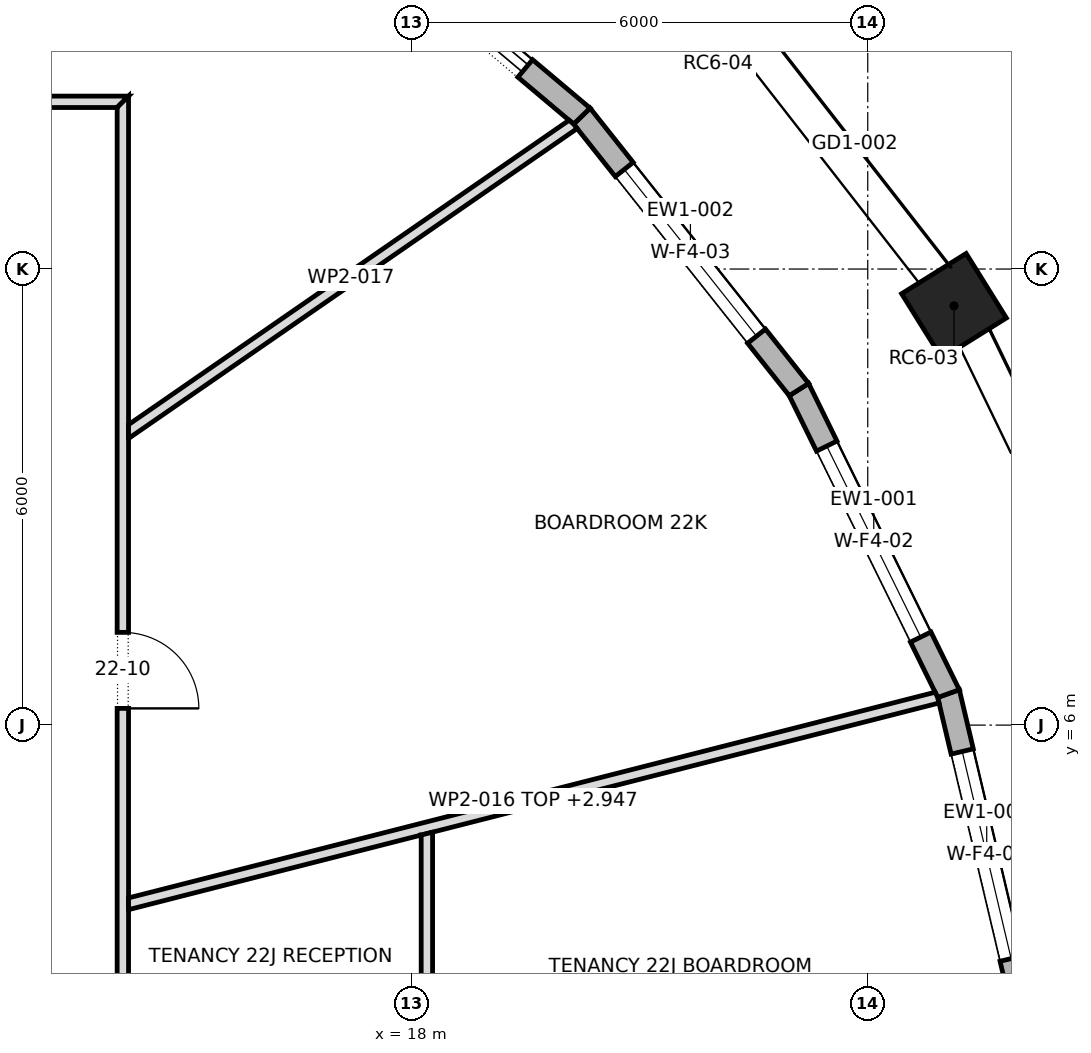
"""IFC4 building model, lengths in metres.
Left out: names, types, materials, properties, quantities, classifications, styles, units other than length and angle.
Written with IfcOpenShell. Run it as: python <this file> out.ifc"""

import sys

from ifc_helpers import new_model, si_unit, direction, frame, frame_2d, origin, origin_2d, place, context, subcontext, project, spatial, polyline, rectangle, outline, extrude, element, fill, save


model = new_model("IFC4")
c1 = context("Model", 3, precision=1e-05, world=origin(), true_north=direction((0.0, 1.0)))
c2 = subcontext(c1, "Body", "Model", "MODEL_VIEW")
j1 = project(units=[si_unit("LENGTHUNIT", "METRE"), si_unit("PLANEANGLEUNIT", "RADIAN")], contexts=[c1])
p1 = place(None, origin())
s1 = spatial("IfcSite", under=j1, at=p1, CompositionType="ELEMENT")
p2 = place(p1, origin())
s2 = spatial("IfcBuilding", under=s1, at=p2, CompositionType="ELEMENT")
p3 = place(p2, frame((0.0, 0.0, 312.3)))
s3 = spatial("IfcBuildingStorey", under=s2, at=p3, CompositionType="ELEMENT", Elevation=312.3)
for number, where, z_axis, x_axis in (
    (1, (25.135, 11.516, 0.0), (0.0, 0.0, 1.0), (-0.529, 0.849, 0.0)),
    (2, (22.031, 15.497, 0.0), (0.0, 0.0, 1.0), (-0.692, 0.722, 0.0)),
):
    element("IfcColumn", number, at=place(p3, frame(where, z_axis=z_axis, x_axis=x_axis)), inside=s3, PredefinedType="COLUMN", context=c2, shape_type="SweptSolid", body=[
        extrude(rectangle(XDim=1.0, YDim=1.0, at=origin_2d()), origin(), (0.0, 0.0, 1.0), 4.0),
    ])
p4 = place(p3, frame((26.067, 2.166, 0.0), z_axis=(0.0, 0.0, 1.0), x_axis=(-0.229974411334, 0.973196675977, 0.0)))
e3 = element("IfcWall", 3, at=p4, inside=s3, PredefinedType="STANDARD", context=c2, shape_type="SweptSolid", body=[
    extrude(outline(polyline([(-0.018, -0.15), (4.382, -0.15), (4.348, 0.15), (0.018, 0.15), (-0.018, -0.15)])), origin(), (0.0, 0.0, 1.0), 3.7),
])
p5 = place(p4, frame((0.783, 0.0, 0.6)))
e4 = element("IfcOpeningElement", 4, at=p5, cuts=e3, PredefinedType="OPENING", context=c2, shape_type="SweptSolid", body=[
    extrude(rectangle(XDim=2.8, YDim=2.65, at=frame_2d((1.4, 1.325))), frame((0.0, 0.162, 0.0), z_axis=(0.0, -1.0, 0.0), x_axis=(1.0, 0.0, 0.0)), (0.0, 0.0, 1.0), 0.324),
])
p6 = place(p3, frame((25.063, 6.415, 0.0), z_axis=(0.0, 0.0, 1.0), x_axis=(-0.441509050872, 0.897256796017, 0.0)))
e5 = element("IfcWall", 5, at=p6, inside=s3, PredefinedType="STANDARD", context=c2, shape_type="SweptSolid", body=[
    extrude(outline(polyline([(-0.017, -0.15), (4.474, -0.15), (4.442, 0.15), (0.017, 0.15), (-0.017, -0.15)])), origin(), (0.0, 0.0, 1.0), 3.7),
])
p7 = place(p6, frame((0.829, 0.0, 0.6)))
e6 = element("IfcOpeningElement", 6, at=p7, cuts=e5, PredefinedType="OPENING", context=c2, shape_type="SweptSolid", body=[
    extrude(rectangle(XDim=2.8, YDim=2.65, at=frame_2d((1.4, 1.325))), frame((0.0, 0.162, 0.0), z_axis=(0.0, -1.0, 0.0), x_axis=(1.0, 0.0, 0.0)), (0.0, 0.0, 1.0), 0.324),
])
p8 = place(p3, frame((23.094, 10.415, 0.0), z_axis=(0.0, 0.0, 1.0), x_axis=(-0.621682706372, 0.78326918272, 0.0)))
e7 = element("IfcWall", 7, at=p8, inside=s3, PredefinedType="STANDARD", context=c2, shape_type="SweptSolid", body=[
    extrude(outline(polyline([(-0.016, -0.15), (4.608, -0.15), (4.578, 0.15), (0.016, 0.15), (-0.016, -0.15)])), origin(), (0.0, 0.0, 1.0), 3.7),
])
p9 = place(p8, frame((0.896, 0.0, 0.6)))
e8 = element("IfcOpeningElement", 8, at=p9, cuts=e7, PredefinedType="OPENING", context=c2, shape_type="SweptSolid", body=[
    extrude(rectangle(XDim=2.8, YDim=2.65, at=frame_2d((1.4, 1.325))), frame((0.0, 0.162, 0.0), z_axis=(0.0, -1.0, 0.0), x_axis=(1.0, 0.0, 0.0)), (0.0, 0.0, 1.0), 0.324),
])
p10 = place(p3, frame((20.239, 14.012, 0.0), z_axis=(0.0, 0.0, 1.0), x_axis=(-0.765059193792, 0.643959959931, 0.0)))
e9 = element("IfcWall", 9, at=p10, inside=s3, PredefinedType="STANDARD", context=c2, shape_type="SweptSolid", body=[
    extrude(outline(polyline([(-0.015, -0.15), (4.762, -0.15), (4.734, 0.15), (0.015, 0.15), (-0.015, -0.15)])), origin(), (0.0, 0.0, 1.0), 3.7),
])
p11 = place(p10, frame((0.974, 0.0, 0.0)))
e10 = element("IfcOpeningElement", 10, at=p11, cuts=e9, PredefinedType="OPENING", context=c2, shape_type="SweptSolid", body=[
    extrude(rectangle(XDim=2.8, YDim=3.25, at=frame_2d((1.4, 1.625))), frame((0.0, 0.162, 0.0), z_axis=(0.0, -1.0, 0.0), x_axis=(1.0, 0.0, 0.0)), (0.0, 0.0, 1.0), 0.324),
])
p12 = place(p3, frame((-14.275, 14.2, 0.0), z_axis=(0.0, 0.0, 1.0), x_axis=(1.0, 0.0, 0.0)))
e11 = element("IfcWall", 11, at=p12, inside=s3, PredefinedType="PARTITIONING", context=c2, shape_type="SweptSolid", body=[
    extrude(outline(polyline([(0.15, -0.075), (2.033, -0.075), (3.917, -0.075), (5.8, -0.075), (7.683, -0.075), (9.567, -0.075), (11.45, -0.075), (13.333, -0.075), (15.217, -0.075), (17.1, -0.075), (18.983, -0.075), (20.866, -0.075), (22.75, -0.075), (24.633, -0.075), (26.517, -0.075), (28.4, -0.075), (28.55, 0.075), (28.55, 0.075), (26.646, 0.075), (24.743, 0.075), (22.84, 0.075), (20.937, 0.075), (19.033, 0.075), (17.13, 0.075), (15.227, 0.075), (13.323, 0.075), (11.42, 0.075), (9.517, 0.075), (7.613, 0.075), (5.71, 0.075), (3.807, 0.075), (1.903, 0.075), (0.0, 0.075), (0.15, -0.075)])), origin(), (0.0, 0.0, 1.0), 3.7),
])
p13 = place(p12, frame((20.045, 0.0, 0.0)))
e12 = element("IfcOpeningElement", 12, at=p13, cuts=e11, PredefinedType="OPENING", context=c2, shape_type="SweptSolid", body=[
    extrude(rectangle(XDim=1.0, YDim=2.1, at=frame_2d((0.5, 1.05))), frame((0.0, 0.087, 0.0), z_axis=(0.0, -1.0, 0.0), x_axis=(1.0, 0.0, 0.0)), (0.0, 0.0, 1.0), 0.174),
])
p14 = place(p12, frame((6.025, 0.0, 0.0)))
e13 = element("IfcOpeningElement", 13, at=p14, cuts=e11, PredefinedType="OPENING", context=c2, shape_type="SweptSolid", body=[
    extrude(rectangle(XDim=1.0, YDim=2.1, at=frame_2d((0.5, 1.05))), frame((0.0, 0.087, 0.0), z_axis=(0.0, -1.0, 0.0), x_axis=(1.0, 0.0, 0.0)), (0.0, 0.0, 1.0), 0.174),
])
p15 = place(p3, frame((14.2, -14.275, 0.0), z_axis=(0.0, 0.0, 1.0), x_axis=(0.0, 1.0, 0.0)))
e14 = element("IfcWall", 14, at=p15, inside=s3, PredefinedType="PARTITIONING", context=c2, shape_type="SweptSolid", body=[
    extrude(outline(polyline([(28.55, -0.075), (28.55, -0.075), (28.4, 0.075), (26.517, 0.075), (24.633, 0.075), (22.75, 0.075), (20.866, 0.075), (18.983, 0.075), (17.1, 0.075), (15.217, 0.075), (13.333, 0.075), (11.45, 0.075), (9.567, 0.075), (7.683, 0.075), (5.8, 0.075), (3.917, 0.075), (2.033, 0.075), (0.15, 0.075), (0.0, -0.075), (1.903, -0.075), (3.807, -0.075), (5.71, -0.075), (7.613, -0.075), (9.517, -0.075), (11.42, -0.075), (13.323, -0.075), (15.227, -0.075), (17.13, -0.075), (19.033, -0.075), (20.937, -0.075), (22.84, -0.075), (24.743, -0.075), (26.646, -0.075), (28.55, -0.075)])), origin(), (0.0, 0.0, 1.0), 3.7),
])
p16 = place(p15, frame((3.48, 0.0, 0.0)))
e15 = element("IfcOpeningElement", 15, at=p16, cuts=e14, PredefinedType="OPENING", context=c2, shape_type="SweptSolid", body=[
    extrude(rectangle(XDim=1.0, YDim=2.1, at=frame_2d((0.5, 1.05))), frame((0.0, 0.087, 0.0), z_axis=(0.0, -1.0, 0.0), x_axis=(1.0, 0.0, 0.0)), (0.0, 0.0, 1.0), 0.174),
])
p17 = place(p15, frame((9.99, 0.0, 0.0)))
e16 = element("IfcOpeningElement", 16, at=p17, cuts=e14, PredefinedType="OPENING", context=c2, shape_type="SweptSolid", body=[
    extrude(rectangle(XDim=1.0, YDim=2.1, at=frame_2d((0.5, 1.05))), frame((0.0, 0.087, 0.0), z_axis=(0.0, -1.0, 0.0), x_axis=(1.0, 0.0, 0.0)), (0.0, 0.0, 1.0), 0.174),
])
p18 = place(p15, frame((15.0, 0.0, 0.0)))
e17 = element("IfcOpeningElement", 17, at=p18, cuts=e14, PredefinedType="OPENING", context=c2, shape_type="SweptSolid", body=[
    extrude(rectangle(XDim=1.0, YDim=2.1, at=frame_2d((0.5, 1.05))), frame((0.0, 0.087, 0.0), z_axis=(0.0, -1.0, 0.0), x_axis=(1.0, 0.0, 0.0)), (0.0, 0.0, 1.0), 0.174),
])
p19 = place(p15, frame((20.495, 0.0, 0.0)))
e18 = element("IfcOpeningElement", 18, at=p19, cuts=e14, PredefinedType="OPENING", context=c2, shape_type="SweptSolid", body=[
    extrude(rectangle(XDim=1.0, YDim=2.1, at=frame_2d((0.5, 1.05))), frame((0.0, 0.087, 0.0), z_axis=(0.0, -1.0, 0.0), x_axis=(1.0, 0.0, 0.0)), (0.0, 0.0, 1.0), 0.174),
])
p20 = place(p3, frame((14.257, 3.645, 0.0), z_axis=(0.0, 0.0, 1.0), x_axis=(0.968996414646, 0.247074783017, 0.0)))
e19 = element("IfcWall", 19, at=p20, inside=s3, PredefinedType="PARTITIONING", context=c2, shape_type="SweptSolid", body=[
    extrude(outline(polyline([(0.0, -0.075), (1.987, -0.075), (3.973, -0.075), (3.973, -0.073), (3.979, -0.075), (5.735, -0.075), (7.491, -0.075), (9.248, -0.075), (11.004, -0.075), (11.004, 0.008), (10.99, 0.075), (9.164, 0.075), (7.339, 0.075), (5.514, 0.075), (3.688, 0.075), (1.863, 0.075), (0.038, 0.075), (0.0, -0.074), (0.0, -0.075)])), origin(), (0.0, 0.0, 1.0), 2.947),
])
p21 = place(p3, frame((14.232, 9.833, 0.0), z_axis=(0.0, 0.0, 1.0), x_axis=(0.822725997435, 0.568438152436, 0.0)))
e20 = element("IfcWall", 20, at=p21, inside=s3, PredefinedType="PARTITIONING", context=c2, shape_type="SweptSolid", body=[
    extrude(outline(polyline([(0.0, -0.075), (1.793, -0.075), (3.587, -0.075), (5.38, -0.075), (7.174, -0.075), (7.169, -0.001), (7.148, 0.075), (5.387, 0.075), (3.626, 0.075), (1.865, 0.075), (0.104, 0.075), (0.0, -0.075), (0.0, -0.075)])), origin(), (0.0, 0.0, 1.0), 3.7),
])
p22 = place(p3, frame((18.2, 4.592, 0.0), z_axis=(0.0, 0.0, 1.0), x_axis=(0.0, -1.0, 0.0)))
e21 = element("IfcWall", 21, at=p22, inside=s3, PredefinedType="PARTITIONING", context=c2, shape_type="SweptSolid", body=[
    extrude(outline(polyline([(0.038, -0.075), (2.032, -0.075), (4.026, -0.075), (6.02, -0.075), (6.031, 0.07), (6.031, 0.075), (4.524, 0.075), (3.016, 0.075), (1.508, 0.075), (0.0, 0.075), (0.0, 0.074), (0.038, -0.075)])), origin(), (0.0, 0.0, 1.0), 3.7),
])
p23 = place(p22, frame((2.521, 0.0, 0.0)))
e22 = element("IfcOpeningElement", 22, at=p23, cuts=e21, PredefinedType="OPENING", context=c2, shape_type="SweptSolid", body=[
    extrude(rectangle(XDim=1.0, YDim=2.1, at=frame_2d((0.5, 1.05))), frame((0.0, 0.087, 0.0), z_axis=(0.0, -1.0, 0.0), x_axis=(1.0, 0.0, 0.0)), (0.0, 0.0, 1.0), 0.174),
])
p24 = place(p5, origin())
e23 = element("IfcWindow", 23, at=p24, inside=s3, PartitioningType="DOUBLE_PANEL_VERTICAL", PredefinedType="WINDOW", context=c2, shape_type="SweptSolid", body=[
    extrude(rectangle(XDim=2.8, YDim=2.65, at=frame_2d((1.4, 1.325))), frame((0.0, 0.03, 0.0), z_axis=(0.0, -1.0, 0.0), x_axis=(1.0, 0.0, 0.0)), (0.0, 0.0, 1.0), 0.06),
])
fill(e4, e23)
p25 = place(p7, origin())
e24 = element("IfcWindow", 24, at=p25, inside=s3, PartitioningType="DOUBLE_PANEL_VERTICAL", PredefinedType="WINDOW", context=c2, shape_type="SweptSolid", body=[
    extrude(rectangle(XDim=2.8, YDim=2.65, at=frame_2d((1.4, 1.325))), frame((0.0, 0.03, 0.0), z_axis=(0.0, -1.0, 0.0), x_axis=(1.0, 0.0, 0.0)), (0.0, 0.0, 1.0), 0.06),
])
fill(e6, e24)
p26 = place(p9, origin())
e25 = element("IfcWindow", 25, at=p26, inside=s3, PartitioningType="DOUBLE_PANEL_VERTICAL", PredefinedType="WINDOW", context=c2, shape_type="SweptSolid", body=[
    extrude(rectangle(XDim=2.8, YDim=2.65, at=frame_2d((1.4, 1.325))), frame((0.0, 0.03, 0.0), z_axis=(0.0, -1.0, 0.0), x_axis=(1.0, 0.0, 0.0)), (0.0, 0.0, 1.0), 0.06),
])
fill(e8, e25)
p27 = place(p11, origin())
e26 = element("IfcDoor", 26, at=p27, inside=s3, OperationType="DOUBLE_DOOR_SLIDING", PredefinedType="DOOR", context=c2, shape_type="SweptSolid", body=[
    extrude(rectangle(XDim=2.8, YDim=3.25, at=frame_2d((1.4, 1.625))), frame((0.0, 0.025, 0.0), z_axis=(0.0, -1.0, 0.0), x_axis=(1.0, 0.0, 0.0)), (0.0, 0.0, 1.0), 0.05),
])
fill(e10, e26)
p28 = place(p19, frame((1.0, 0.0, 0.0), z_axis=(0.0, 0.0, 1.0), x_axis=(-1.0, 0.0, 0.0)))
e27 = element("IfcDoor", 27, at=p28, inside=s3, OperationType="SINGLE_SWING_LEFT", PredefinedType="DOOR", context=c2, shape_type="SweptSolid", body=[
    extrude(rectangle(XDim=1.0, YDim=2.1, at=frame_2d((0.5, 1.05))), frame((0.0, 0.025, 0.0), z_axis=(0.0, -1.0, 0.0), x_axis=(1.0, 0.0, 0.0)), (0.0, 0.0, 1.0), 0.05),
])
fill(e18, e27)
save(model, sys.argv[1])
